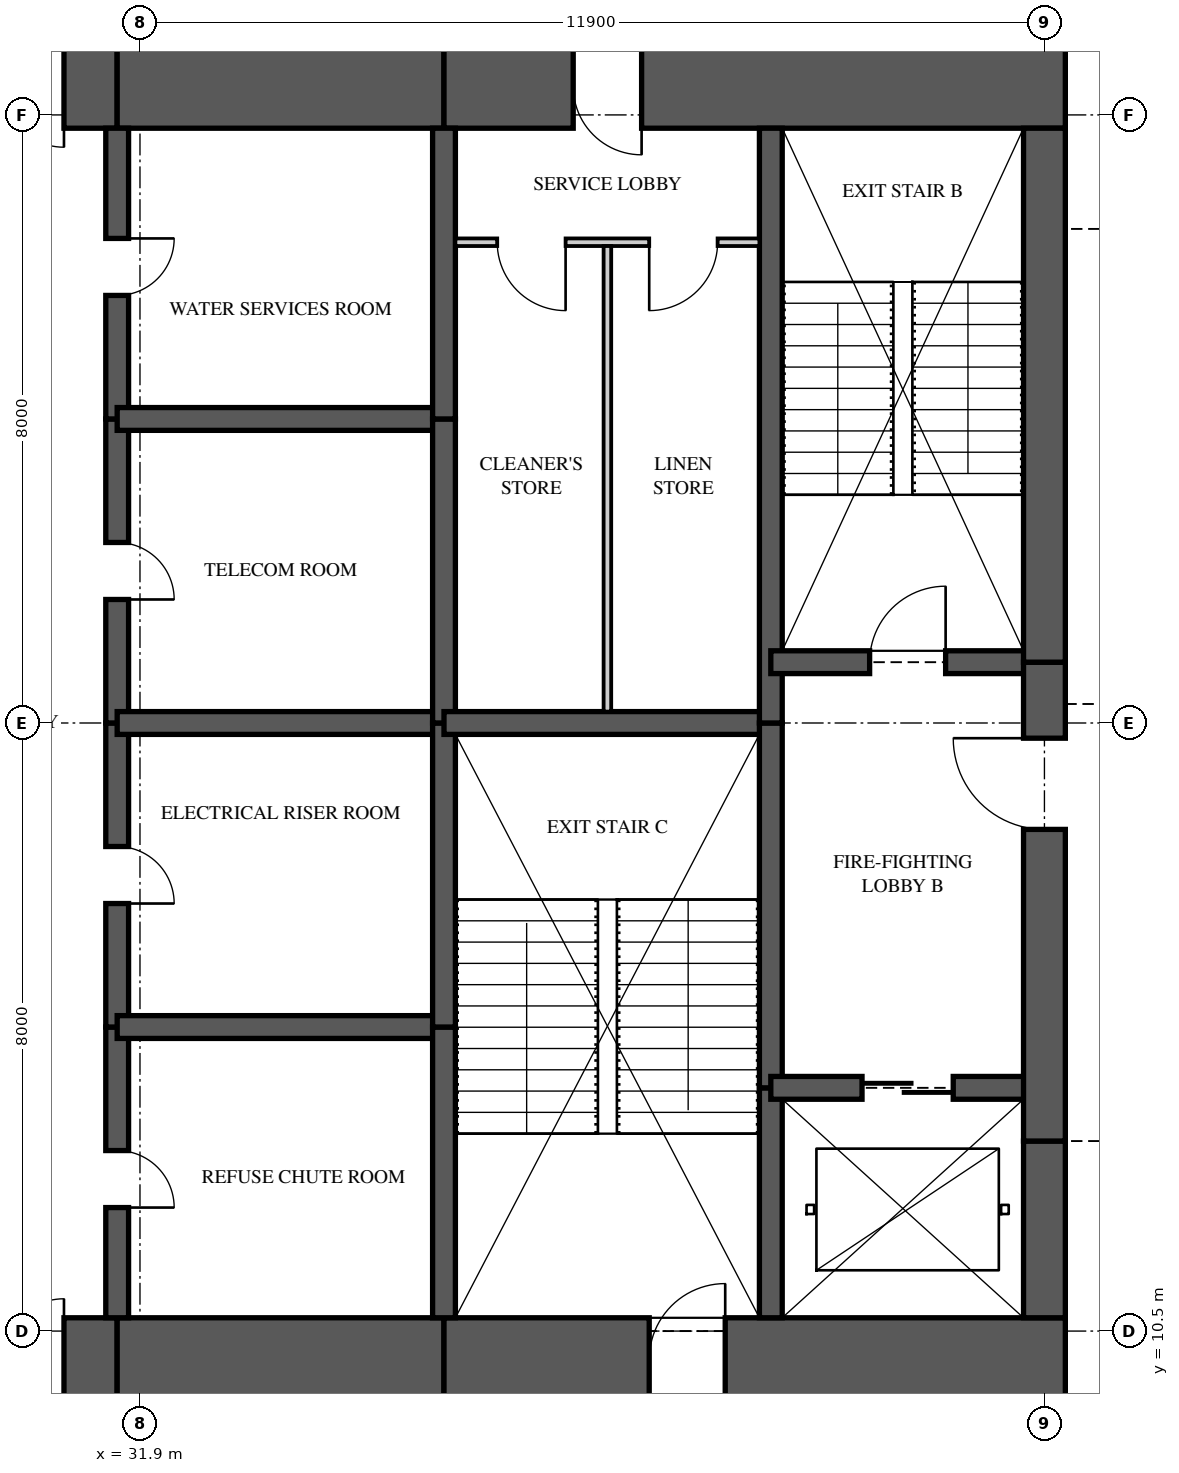
"""IFC4 building model, lengths in metres.
Left out: names, types, materials, properties, quantities, classifications, styles, units other than length and angle.
Written with IfcOpenShell. Run it as: python <this file> out.ifc"""

import sys

from ifc_helpers import new_model, si_unit, direction, frame, frame_2d, origin, place, context, subcontext, project, spatial, rectangle, extrude, element, fill, save


model = new_model("IFC4")
c1 = context("Model", 3, precision=1e-05, world=origin(), true_north=direction((0.0, 1.0)))
c2 = subcontext(c1, "Body", "Model", "MODEL_VIEW")
j1 = project(units=[si_unit("LENGTHUNIT", "METRE"), si_unit("PLANEANGLEUNIT", "RADIAN")], contexts=[c1])
p1 = place(None, origin())
s1 = spatial("IfcSite", under=j1, at=p1, CompositionType="ELEMENT")
p2 = place(p1, origin())
s2 = spatial("IfcBuilding", under=s1, at=p2, CompositionType="ELEMENT")
p3 = place(p2, frame((0.0, 0.0, 263.85)))
s3 = spatial("IfcBuildingStorey", under=s2, at=p3, CompositionType="ELEMENT", Elevation=263.85)
p4 = place(p3, frame((26.0, 10.125, 0.0), z_axis=(0.0, 0.0, 1.0), x_axis=(1.0, 0.0, 0.0)))
e1 = element("IfcWall", 1, at=p4, inside=s3, PredefinedType="SHEAR", context=c2, shape_type="SweptSolid", body=[
    extrude(rectangle(XDim=5.6, YDim=1.1, at=frame_2d((2.8, 0.0))), origin(), (0.0, 0.0, 1.0), 3.9),
])
p5 = place(p4, frame((3.3, 0.0, 0.0)))
e2 = element("IfcOpeningElement", 2, at=p5, cuts=e1, PredefinedType="OPENING", context=c2, shape_type="SweptSolid", body=[
    extrude(rectangle(XDim=1.6, YDim=2.1, at=frame_2d((0.8, 1.05))), frame((0.0, 0.56, 0.0), z_axis=(0.0, -1.0, 0.0), x_axis=(1.0, 0.0, 0.0)), (0.0, 0.0, 1.0), 1.12),
])
p6 = place(p3, frame((31.6, 10.125, 0.0), z_axis=(0.0, 0.0, 1.0), x_axis=(1.0, 0.0, 0.0)))
e3 = element("IfcWall", 3, at=p6, inside=s3, PredefinedType="SHEAR", context=c2, shape_type="SweptSolid", body=[
    extrude(rectangle(XDim=4.3, YDim=1.1, at=frame_2d((2.15, 0.0))), origin(), (0.0, 0.0, 1.0), 3.9),
])
p7 = place(p3, frame((35.9, 10.125, 0.0), z_axis=(0.0, 0.0, 1.0), x_axis=(1.0, 0.0, 0.0)))
e4 = element("IfcWall", 4, at=p7, inside=s3, PredefinedType="SHEAR", context=c2, shape_type="SweptSolid", body=[
    extrude(rectangle(XDim=8.175, YDim=1.1, at=frame_2d((4.087, 0.0))), origin(), (0.0, 0.0, 1.0), 3.9),
])
p8 = place(p7, frame((2.7, 0.0, 0.0)))
e5 = element("IfcOpeningElement", 5, at=p8, cuts=e4, PredefinedType="OPENING", context=c2, shape_type="SweptSolid", body=[
    extrude(rectangle(XDim=1.0, YDim=2.1, at=frame_2d((0.5, 1.05))), frame((0.0, 0.56, 0.0), z_axis=(0.0, -1.0, 0.0), x_axis=(1.0, 0.0, 0.0)), (0.0, 0.0, 1.0), 1.12),
])
p9 = place(p3, frame((44.075, 26.875, 0.0), z_axis=(0.0, 0.0, 1.0), x_axis=(-1.0, 0.0, 0.0)))
e6 = element("IfcWall", 6, at=p9, inside=s3, PredefinedType="SHEAR", context=c2, shape_type="SweptSolid", body=[
    extrude(rectangle(XDim=8.175, YDim=1.1, at=frame_2d((4.087, 0.0))), origin(), (0.0, 0.0, 1.0), 3.9),
])
p10 = place(p9, frame((5.575, 0.0, 0.0)))
e7 = element("IfcOpeningElement", 7, at=p10, cuts=e6, PredefinedType="OPENING", context=c2, shape_type="SweptSolid", body=[
    extrude(rectangle(XDim=0.9, YDim=2.1, at=frame_2d((0.45, 1.05))), frame((0.0, 0.56, 0.0), z_axis=(0.0, -1.0, 0.0), x_axis=(1.0, 0.0, 0.0)), (0.0, 0.0, 1.0), 1.12),
])
p11 = place(p3, frame((35.9, 26.875, 0.0), z_axis=(0.0, 0.0, 1.0), x_axis=(-1.0, 0.0, 0.0)))
e8 = element("IfcWall", 8, at=p11, inside=s3, PredefinedType="SHEAR", context=c2, shape_type="SweptSolid", body=[
    extrude(rectangle(XDim=4.3, YDim=1.1, at=frame_2d((2.15, 0.0))), origin(), (0.0, 0.0, 1.0), 3.9),
])
p12 = place(p3, frame((31.6, 26.875, 0.0), z_axis=(0.0, 0.0, 1.0), x_axis=(-1.0, 0.0, 0.0)))
e9 = element("IfcWall", 9, at=p12, inside=s3, PredefinedType="SHEAR", context=c2, shape_type="SweptSolid", body=[
    extrude(rectangle(XDim=5.6, YDim=1.1, at=frame_2d((2.8, 0.0))), origin(), (0.0, 0.0, 1.0), 3.9),
])
p13 = place(p12, frame((0.7, 0.0, 0.0)))
e10 = element("IfcOpeningElement", 10, at=p13, cuts=e9, PredefinedType="OPENING", context=c2, shape_type="SweptSolid", body=[
    extrude(rectangle(XDim=1.6, YDim=2.1, at=frame_2d((0.8, 1.05))), frame((0.0, 0.56, 0.0), z_axis=(0.0, -1.0, 0.0), x_axis=(1.0, 0.0, 0.0)), (0.0, 0.0, 1.0), 1.12),
])
p14 = place(p3, frame((43.8, 10.675, 0.0), z_axis=(0.0, 0.0, 1.0), x_axis=(0.0, 1.0, 0.0)))
e11 = element("IfcWall", 11, at=p14, inside=s3, PredefinedType="SHEAR", context=c2, shape_type="SweptSolid", body=[
    extrude(rectangle(XDim=2.325, YDim=0.55, at=frame_2d((1.163, 0.0))), origin(), (0.0, 0.0, 1.0), 3.9),
])
p15 = place(p3, frame((43.8, 13.0, 0.0), z_axis=(0.0, 0.0, 1.0), x_axis=(0.0, 1.0, 0.0)))
e12 = element("IfcWall", 12, at=p15, inside=s3, PredefinedType="SHEAR", context=c2, shape_type="SweptSolid", body=[
    extrude(rectangle(XDim=6.3, YDim=0.55, at=frame_2d((3.15, 0.0))), origin(), (0.0, 0.0, 1.0), 3.9),
])
p16 = place(p15, frame((4.1, 0.0, 0.0)))
e13 = element("IfcOpeningElement", 13, at=p16, cuts=e12, PredefinedType="OPENING", context=c2, shape_type="SweptSolid", body=[
    extrude(rectangle(XDim=1.2, YDim=2.2, at=frame_2d((0.6, 1.1))), frame((0.0, 0.285, 0.0), z_axis=(0.0, -1.0, 0.0), x_axis=(1.0, 0.0, 0.0)), (0.0, 0.0, 1.0), 0.57),
])
p17 = place(p3, frame((43.8, 19.3, 0.0), z_axis=(0.0, 0.0, 1.0), x_axis=(0.0, 1.0, 0.0)))
e14 = element("IfcWall", 14, at=p17, inside=s3, PredefinedType="SHEAR", context=c2, shape_type="SweptSolid", body=[
    extrude(rectangle(XDim=7.025, YDim=0.55, at=frame_2d((3.512, 0.0))), origin(), (0.0, 0.0, 1.0), 3.9),
])
p18 = place(p3, frame((31.6, 10.675, 0.0), z_axis=(0.0, 0.0, 1.0), x_axis=(0.0, 1.0, 0.0)))
e15 = element("IfcWall", 15, at=p18, inside=s3, PredefinedType="SHEAR", context=c2, shape_type="SweptSolid", body=[
    extrude(rectangle(XDim=3.825, YDim=0.3, at=frame_2d((1.913, 0.0))), origin(), (0.0, 0.0, 1.0), 3.9),
])
p19 = place(p18, frame((1.45, 0.0, 0.0)))
e16 = element("IfcOpeningElement", 16, at=p19, cuts=e15, PredefinedType="OPENING", context=c2, shape_type="SweptSolid", body=[
    extrude(rectangle(XDim=0.75, YDim=2.1, at=frame_2d((0.375, 1.05))), frame((0.0, 0.16, 0.0), z_axis=(0.0, -1.0, 0.0), x_axis=(1.0, 0.0, 0.0)), (0.0, 0.0, 1.0), 0.32),
])
p20 = place(p3, frame((31.6, 14.5, 0.0), z_axis=(0.0, 0.0, 1.0), x_axis=(0.0, 1.0, 0.0)))
e17 = element("IfcWall", 17, at=p20, inside=s3, PredefinedType="SHEAR", context=c2, shape_type="SweptSolid", body=[
    extrude(rectangle(XDim=4.0, YDim=0.3, at=frame_2d((2.0, 0.0))), origin(), (0.0, 0.0, 1.0), 3.9),
])
p21 = place(p20, frame((1.625, 0.0, 0.0)))
e18 = element("IfcOpeningElement", 18, at=p21, cuts=e17, PredefinedType="OPENING", context=c2, shape_type="SweptSolid", body=[
    extrude(rectangle(XDim=0.75, YDim=2.1, at=frame_2d((0.375, 1.05))), frame((0.0, 0.16, 0.0), z_axis=(0.0, -1.0, 0.0), x_axis=(1.0, 0.0, 0.0)), (0.0, 0.0, 1.0), 0.32),
])
p22 = place(p3, frame((31.6, 18.5, 0.0), z_axis=(0.0, 0.0, 1.0), x_axis=(0.0, 1.0, 0.0)))
e19 = element("IfcWall", 19, at=p22, inside=s3, PredefinedType="SHEAR", context=c2, shape_type="SweptSolid", body=[
    extrude(rectangle(XDim=4.0, YDim=0.3, at=frame_2d((2.0, 0.0))), origin(), (0.0, 0.0, 1.0), 3.9),
])
p23 = place(p22, frame((1.625, 0.0, 0.0)))
e20 = element("IfcOpeningElement", 20, at=p23, cuts=e19, PredefinedType="OPENING", context=c2, shape_type="SweptSolid", body=[
    extrude(rectangle(XDim=0.75, YDim=2.1, at=frame_2d((0.375, 1.05))), frame((0.0, 0.16, 0.0), z_axis=(0.0, -1.0, 0.0), x_axis=(1.0, 0.0, 0.0)), (0.0, 0.0, 1.0), 0.32),
])
p24 = place(p3, frame((31.6, 22.5, 0.0), z_axis=(0.0, 0.0, 1.0), x_axis=(0.0, 1.0, 0.0)))
e21 = element("IfcWall", 21, at=p24, inside=s3, PredefinedType="SHEAR", context=c2, shape_type="SweptSolid", body=[
    extrude(rectangle(XDim=3.825, YDim=0.3, at=frame_2d((1.913, 0.0))), origin(), (0.0, 0.0, 1.0), 3.9),
])
p25 = place(p24, frame((1.625, 0.0, 0.0)))
e22 = element("IfcOpeningElement", 22, at=p25, cuts=e21, PredefinedType="OPENING", context=c2, shape_type="SweptSolid", body=[
    extrude(rectangle(XDim=0.75, YDim=2.1, at=frame_2d((0.375, 1.05))), frame((0.0, 0.16, 0.0), z_axis=(0.0, -1.0, 0.0), x_axis=(1.0, 0.0, 0.0)), (0.0, 0.0, 1.0), 0.32),
])
p26 = place(p3, frame((35.9, 10.675, 0.0), z_axis=(0.0, 0.0, 1.0), x_axis=(0.0, 1.0, 0.0)))
e23 = element("IfcWall", 23, at=p26, inside=s3, PredefinedType="SHEAR", context=c2, shape_type="SweptSolid", body=[
    extrude(rectangle(XDim=3.825, YDim=0.3, at=frame_2d((1.913, 0.0))), origin(), (0.0, 0.0, 1.0), 3.9),
])
for number, where, z_axis, x_axis in (
    (24, (35.9, 14.5, 0.0), (0.0, 0.0, 1.0), (0.0, 1.0, 0.0)),
    (25, (35.9, 18.5, 0.0), (0.0, 0.0, 1.0), (0.0, 1.0, 0.0)),
):
    element("IfcWall", number, at=place(p3, frame(where, z_axis=z_axis, x_axis=x_axis)), inside=s3, PredefinedType="SHEAR", context=c2, shape_type="SweptSolid", body=[
        extrude(rectangle(XDim=4.0, YDim=0.3, at=frame_2d((2.0, 0.0))), origin(), (0.0, 0.0, 1.0), 3.9),
    ])
p27 = place(p3, frame((35.9, 22.5, 0.0), z_axis=(0.0, 0.0, 1.0), x_axis=(0.0, 1.0, 0.0)))
e26 = element("IfcWall", 26, at=p27, inside=s3, PredefinedType="SHEAR", context=c2, shape_type="SweptSolid", body=[
    extrude(rectangle(XDim=3.825, YDim=0.3, at=frame_2d((1.913, 0.0))), origin(), (0.0, 0.0, 1.0), 3.9),
])
p28 = place(p3, frame((40.2, 10.675, 0.0), z_axis=(0.0, 0.0, 1.0), x_axis=(0.0, 1.0, 0.0)))
e27 = element("IfcWall", 27, at=p28, inside=s3, PredefinedType="SHEAR", context=c2, shape_type="SweptSolid", body=[
    extrude(rectangle(XDim=3.025, YDim=0.3, at=frame_2d((1.512, 0.0))), origin(), (0.0, 0.0, 1.0), 3.9),
])
p29 = place(p3, frame((40.2, 13.7, 0.0), z_axis=(0.0, 0.0, 1.0), x_axis=(0.0, 1.0, 0.0)))
e28 = element("IfcWall", 28, at=p29, inside=s3, PredefinedType="SHEAR", context=c2, shape_type="SweptSolid", body=[
    extrude(rectangle(XDim=4.8, YDim=0.3, at=frame_2d((2.4, 0.0))), origin(), (0.0, 0.0, 1.0), 3.9),
])
p30 = place(p3, frame((40.2, 18.5, 0.0), z_axis=(0.0, 0.0, 1.0), x_axis=(0.0, 1.0, 0.0)))
e29 = element("IfcWall", 29, at=p30, inside=s3, PredefinedType="SHEAR", context=c2, shape_type="SweptSolid", body=[
    extrude(rectangle(XDim=7.825, YDim=0.3, at=frame_2d((3.913, 0.0))), origin(), (0.0, 0.0, 1.0), 3.9),
])
for number, where, z_axis, x_axis in (
    (30, (31.6, 14.5, 0.0), (0.0, 0.0, 1.0), (1.0, 0.0, 0.0)),
    (31, (31.6, 18.5, 0.0), (0.0, 0.0, 1.0), (1.0, 0.0, 0.0)),
    (32, (31.6, 22.5, 0.0), (0.0, 0.0, 1.0), (1.0, 0.0, 0.0)),
):
    element("IfcWall", number, at=place(p3, frame(where, z_axis=z_axis, x_axis=x_axis)), inside=s3, PredefinedType="SHEAR", context=c2, shape_type="SweptSolid", body=[
        extrude(rectangle(XDim=4.3, YDim=0.3, at=frame_2d((2.15, 0.0))), origin(), (0.0, 0.0, 1.0), 3.9),
    ])
p31 = place(p3, frame((35.9, 18.5, 0.0), z_axis=(0.0, 0.0, 1.0), x_axis=(1.0, 0.0, 0.0)))
e33 = element("IfcWall", 33, at=p31, inside=s3, PredefinedType="SHEAR", context=c2, shape_type="SweptSolid", body=[
    extrude(rectangle(XDim=4.3, YDim=0.3, at=frame_2d((2.15, 0.0))), origin(), (0.0, 0.0, 1.0), 3.9),
])
p32 = place(p3, frame((40.2, 13.7, 0.0), z_axis=(0.0, 0.0, 1.0), x_axis=(1.0, 0.0, 0.0)))
e34 = element("IfcWall", 34, at=p32, inside=s3, PredefinedType="SHEAR", context=c2, shape_type="SweptSolid", body=[
    extrude(rectangle(XDim=3.6, YDim=0.3, at=frame_2d((1.8, 0.0))), origin(), (0.0, 0.0, 1.0), 3.9),
])
p33 = place(p32, frame((1.2, 0.0, 0.0)))
e35 = element("IfcOpeningElement", 35, at=p33, cuts=e34, PredefinedType="OPENING", context=c2, shape_type="SweptSolid", body=[
    extrude(rectangle(XDim=1.2, YDim=2.1, at=frame_2d((0.6, 1.05))), frame((0.0, 0.16, 0.0), z_axis=(0.0, -1.0, 0.0), x_axis=(1.0, 0.0, 0.0)), (0.0, 0.0, 1.0), 0.32),
])
p34 = place(p3, frame((40.2, 19.3, 0.0), z_axis=(0.0, 0.0, 1.0), x_axis=(1.0, 0.0, 0.0)))
e36 = element("IfcWall", 36, at=p34, inside=s3, PredefinedType="SHEAR", context=c2, shape_type="SweptSolid", body=[
    extrude(rectangle(XDim=3.6, YDim=0.3, at=frame_2d((1.8, 0.0))), origin(), (0.0, 0.0, 1.0), 3.9),
])
p35 = place(p34, frame((1.3, 0.0, 0.0)))
e37 = element("IfcOpeningElement", 37, at=p35, cuts=e36, PredefinedType="OPENING", context=c2, shape_type="SweptSolid", body=[
    extrude(rectangle(XDim=1.0, YDim=2.1, at=frame_2d((0.5, 1.05))), frame((0.0, 0.16, 0.0), z_axis=(0.0, -1.0, 0.0), x_axis=(1.0, 0.0, 0.0)), (0.0, 0.0, 1.0), 0.32),
])
p36 = place(p3, frame((36.05, 24.825, 0.0), z_axis=(0.0, 0.0, 1.0), x_axis=(1.0, 0.0, 0.0)))
e38 = element("IfcWall", 38, at=p36, inside=s3, PredefinedType="PARTITIONING", context=c2, shape_type="SweptSolid", body=[
    extrude(rectangle(XDim=4.0, YDim=0.1, at=frame_2d((2.0, 0.0))), origin(), (0.0, 0.0, 1.0), 3.62),
])
p37 = place(p36, frame((0.55, 0.0, 0.0)))
e39 = element("IfcOpeningElement", 39, at=p37, cuts=e38, PredefinedType="OPENING", context=c2, shape_type="SweptSolid", body=[
    extrude(rectangle(XDim=0.9, YDim=2.1, at=frame_2d((0.45, 1.05))), frame((0.0, 0.06, 0.0), z_axis=(0.0, -1.0, 0.0), x_axis=(1.0, 0.0, 0.0)), (0.0, 0.0, 1.0), 0.12),
])
p38 = place(p36, frame((2.55, 0.0, 0.0)))
e40 = element("IfcOpeningElement", 40, at=p38, cuts=e38, PredefinedType="OPENING", context=c2, shape_type="SweptSolid", body=[
    extrude(rectangle(XDim=0.9, YDim=2.1, at=frame_2d((0.45, 1.05))), frame((0.0, 0.06, 0.0), z_axis=(0.0, -1.0, 0.0), x_axis=(1.0, 0.0, 0.0)), (0.0, 0.0, 1.0), 0.12),
])
p39 = place(p3, frame((38.05, 18.65, 0.0), z_axis=(0.0, 0.0, 1.0), x_axis=(0.0, 1.0, 0.0)))
e41 = element("IfcWall", 41, at=p39, inside=s3, PredefinedType="PARTITIONING", context=c2, shape_type="SweptSolid", body=[
    extrude(rectangle(XDim=6.125, YDim=0.1, at=frame_2d((3.062, 0.0))), origin(), (0.0, 0.0, 1.0), 3.62),
])
p40 = place(p37, frame((0.9, 0.0, 0.0), z_axis=(0.0, 0.0, 1.0), x_axis=(-1.0, 0.0, 0.0)))
e42 = element("IfcDoor", 42, at=p40, inside=s3, OperationType="SINGLE_SWING_LEFT", PredefinedType="DOOR", context=c2, shape_type="SweptSolid", body=[
    extrude(rectangle(XDim=0.9, YDim=2.1, at=frame_2d((0.45, 1.05))), frame((0.0, 0.025, 0.0), z_axis=(0.0, -1.0, 0.0), x_axis=(1.0, 0.0, 0.0)), (0.0, 0.0, 1.0), 0.05),
])
fill(e39, e42)
p41 = place(p38, frame((0.9, 0.0, 0.0), z_axis=(0.0, 0.0, 1.0), x_axis=(-1.0, 0.0, 0.0)))
e43 = element("IfcDoor", 43, at=p41, inside=s3, OperationType="SINGLE_SWING_RIGHT", PredefinedType="DOOR", context=c2, shape_type="SweptSolid", body=[
    extrude(rectangle(XDim=0.9, YDim=2.1, at=frame_2d((0.45, 1.05))), frame((0.0, 0.025, 0.0), z_axis=(0.0, -1.0, 0.0), x_axis=(1.0, 0.0, 0.0)), (0.0, 0.0, 1.0), 0.05),
])
fill(e40, e43)
p42 = place(p35, origin())
e44 = element("IfcDoor", 44, at=p42, inside=s3, OperationType="SINGLE_SWING_RIGHT", PredefinedType="DOOR", context=c2, shape_type="SweptSolid", body=[
    extrude(rectangle(XDim=1.0, YDim=2.1, at=frame_2d((0.5, 1.05))), frame((0.0, 0.025, 0.0), z_axis=(0.0, -1.0, 0.0), x_axis=(1.0, 0.0, 0.0)), (0.0, 0.0, 1.0), 0.05),
])
fill(e37, e44)
p43 = place(p16, origin())
e45 = element("IfcDoor", 45, at=p43, inside=s3, OperationType="SINGLE_SWING_RIGHT", PredefinedType="DOOR", context=c2, shape_type="SweptSolid", body=[
    extrude(rectangle(XDim=1.2, YDim=2.2, at=frame_2d((0.6, 1.1))), frame((0.0, 0.025, 0.0), z_axis=(0.0, -1.0, 0.0), x_axis=(1.0, 0.0, 0.0)), (0.0, 0.0, 1.0), 0.05),
])
fill(e13, e45)
p44 = place(p33, origin())
e46 = element("IfcDoor", 46, at=p44, inside=s3, OperationType="SLIDING_TO_LEFT", PredefinedType="DOOR", context=c2, shape_type="SweptSolid", body=[
    extrude(rectangle(XDim=1.2, YDim=2.1, at=frame_2d((0.6, 1.05))), frame((0.0, 0.025, 0.0), z_axis=(0.0, -1.0, 0.0), x_axis=(1.0, 0.0, 0.0)), (0.0, 0.0, 1.0), 0.05),
])
fill(e35, e46)
p45 = place(p5, origin())
e47 = element("IfcDoor", 47, at=p45, inside=s3, OperationType="DOUBLE_DOOR_SINGLE_SWING", PredefinedType="DOOR", context=c2, shape_type="SweptSolid", body=[
    extrude(rectangle(XDim=1.6, YDim=2.1, at=frame_2d((0.8, 1.05))), frame((0.0, 0.025, 0.0), z_axis=(0.0, -1.0, 0.0), x_axis=(1.0, 0.0, 0.0)), (0.0, 0.0, 1.0), 0.05),
])
fill(e2, e47)
p46 = place(p13, origin())
e48 = element("IfcDoor", 48, at=p46, inside=s3, OperationType="DOUBLE_DOOR_SINGLE_SWING", PredefinedType="DOOR", context=c2, shape_type="SweptSolid", body=[
    extrude(rectangle(XDim=1.6, YDim=2.1, at=frame_2d((0.8, 1.05))), frame((0.0, 0.025, 0.0), z_axis=(0.0, -1.0, 0.0), x_axis=(1.0, 0.0, 0.0)), (0.0, 0.0, 1.0), 0.05),
])
fill(e10, e48)
p47 = place(p19, frame((0.75, 0.0, 0.0), z_axis=(0.0, 0.0, 1.0), x_axis=(-1.0, 0.0, 0.0)))
e49 = element("IfcDoor", 49, at=p47, inside=s3, OperationType="SINGLE_SWING_RIGHT", PredefinedType="DOOR", context=c2, shape_type="SweptSolid", body=[
    extrude(rectangle(XDim=0.75, YDim=2.1, at=frame_2d((0.375, 1.05))), frame((0.0, 0.025, 0.0), z_axis=(0.0, -1.0, 0.0), x_axis=(1.0, 0.0, 0.0)), (0.0, 0.0, 1.0), 0.05),
])
fill(e16, e49)
p48 = place(p21, frame((0.75, 0.0, 0.0), z_axis=(0.0, 0.0, 1.0), x_axis=(-1.0, 0.0, 0.0)))
e50 = element("IfcDoor", 50, at=p48, inside=s3, OperationType="SINGLE_SWING_RIGHT", PredefinedType="DOOR", context=c2, shape_type="SweptSolid", body=[
    extrude(rectangle(XDim=0.75, YDim=2.1, at=frame_2d((0.375, 1.05))), frame((0.0, 0.025, 0.0), z_axis=(0.0, -1.0, 0.0), x_axis=(1.0, 0.0, 0.0)), (0.0, 0.0, 1.0), 0.05),
])
fill(e18, e50)
p49 = place(p23, frame((0.75, 0.0, 0.0), z_axis=(0.0, 0.0, 1.0), x_axis=(-1.0, 0.0, 0.0)))
e51 = element("IfcDoor", 51, at=p49, inside=s3, OperationType="SINGLE_SWING_RIGHT", PredefinedType="DOOR", context=c2, shape_type="SweptSolid", body=[
    extrude(rectangle(XDim=0.75, YDim=2.1, at=frame_2d((0.375, 1.05))), frame((0.0, 0.025, 0.0), z_axis=(0.0, -1.0, 0.0), x_axis=(1.0, 0.0, 0.0)), (0.0, 0.0, 1.0), 0.05),
])
fill(e20, e51)
p50 = place(p25, frame((0.75, 0.0, 0.0), z_axis=(0.0, 0.0, 1.0), x_axis=(-1.0, 0.0, 0.0)))
e52 = element("IfcDoor", 52, at=p50, inside=s3, OperationType="SINGLE_SWING_LEFT", PredefinedType="DOOR", context=c2, shape_type="SweptSolid", body=[
    extrude(rectangle(XDim=0.75, YDim=2.1, at=frame_2d((0.375, 1.05))), frame((0.0, 0.025, 0.0), z_axis=(0.0, -1.0, 0.0), x_axis=(1.0, 0.0, 0.0)), (0.0, 0.0, 1.0), 0.05),
])
fill(e22, e52)
p51 = place(p8, origin())
e53 = element("IfcDoor", 53, at=p51, inside=s3, OperationType="SINGLE_SWING_RIGHT", PredefinedType="DOOR", context=c2, shape_type="SweptSolid", body=[
    extrude(rectangle(XDim=1.0, YDim=2.1, at=frame_2d((0.5, 1.05))), frame((0.0, 0.025, 0.0), z_axis=(0.0, -1.0, 0.0), x_axis=(1.0, 0.0, 0.0)), (0.0, 0.0, 1.0), 0.05),
])
fill(e5, e53)
p52 = place(p10, origin())
e54 = element("IfcDoor", 54, at=p52, inside=s3, OperationType="SINGLE_SWING_LEFT", PredefinedType="DOOR", context=c2, shape_type="SweptSolid", body=[
    extrude(rectangle(XDim=0.9, YDim=2.1, at=frame_2d((0.45, 1.05))), frame((0.0, 0.47, 0.0), z_axis=(0.0, -1.0, 0.0), x_axis=(1.0, 0.0, 0.0)), (0.0, 0.0, 1.0), 0.8),
])
fill(e7, e54)
save(model, sys.argv[1])
